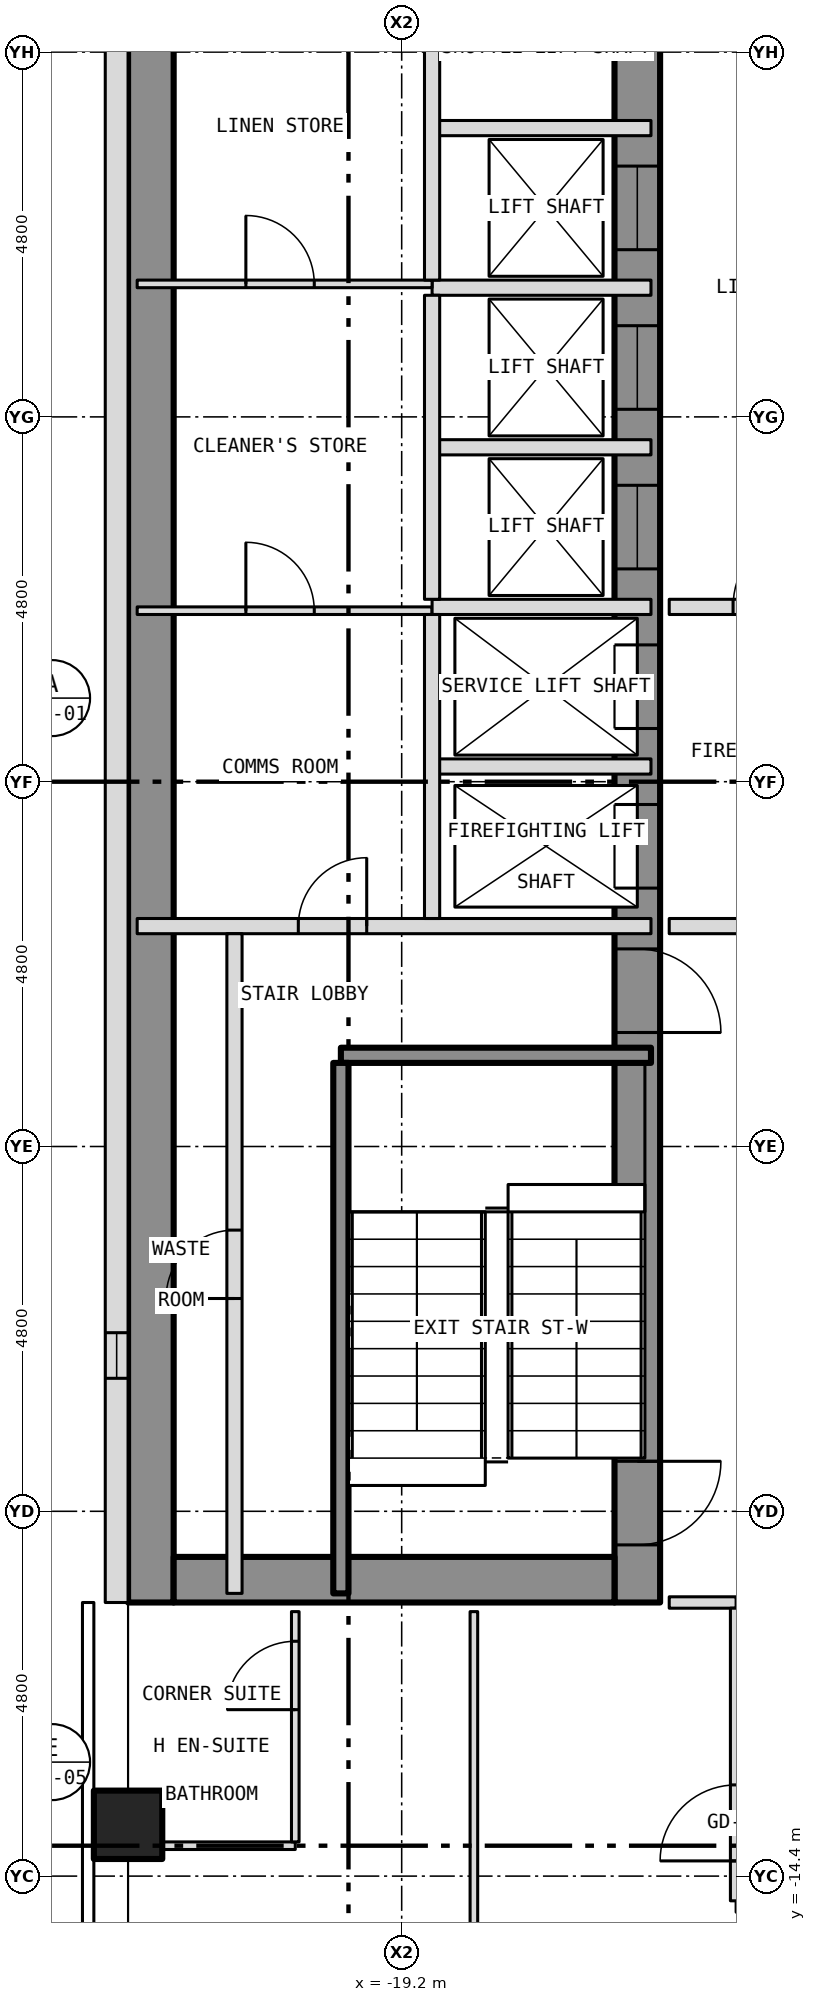
"""IFC4 building model, lengths in metres.
Left out: names, types, materials, properties, quantities, classifications, styles, units other than length and angle.
Written with IfcOpenShell. Run it as: python <this file> out.ifc"""

import sys

from ifc_helpers import new_model, si_unit, direction, frame, frame_2d, origin, origin_2d, place, context, subcontext, project, spatial, rectangle, hollow_rectangle, extrude, element, fill, save


model = new_model("IFC4")
c1 = context("Model", 3, precision=1e-05, world=origin(), true_north=direction((0.0, 1.0)))
c2 = subcontext(c1, "Body", "Model", "MODEL_VIEW")
j1 = project(units=[si_unit("LENGTHUNIT", "METRE"), si_unit("PLANEANGLEUNIT", "RADIAN")], contexts=[c1])
p1 = place(None, origin())
s1 = spatial("IfcSite", under=j1, at=p1, CompositionType="ELEMENT")
p2 = place(p1, origin())
s2 = spatial("IfcBuilding", under=s1, at=p2, CompositionType="ELEMENT")
p3 = place(p2, frame((0.0, 0.0, 103.0)))
s3 = spatial("IfcBuildingStorey", under=s2, at=p3, CompositionType="ELEMENT", Elevation=103.0)
p4 = place(p3, frame((-22.8, -13.725, -0.15), z_axis=(0.0, 0.0, 1.0), x_axis=(1.0, 0.0, 0.0)))
e1 = element("IfcColumn", 1, at=p4, inside=s3, PredefinedType="COLUMN", context=c2, shape_type="SweptSolid", body=[
    extrude(hollow_rectangle(XDim=0.9, YDim=0.9, WallThickness=0.05, at=origin_2d()), origin(), (0.0, 0.0, 1.0), 3.5),
])
p5 = place(p3, frame((-16.1, -10.8, 0.0), z_axis=(0.0, 0.0, 1.0), x_axis=(0.0, 1.0, 0.0)))
e2 = element("IfcWall", 2, at=p5, inside=s3, PredefinedType="SHEAR", context=c2, shape_type="SweptSolid", body=[
    extrude(rectangle(XDim=21.6, YDim=0.6, at=frame_2d((10.8, 0.0))), origin(), (0.0, 0.0, 1.0), 3.25),
])
p6 = place(p5, frame((9.4, 0.0, 0.0)))
e3 = element("IfcOpeningElement", 3, at=p6, cuts=e2, PredefinedType="OPENING", context=c2, shape_type="SweptSolid", body=[
    extrude(rectangle(XDim=1.1, YDim=2.1, at=frame_2d((0.55, 1.05))), frame((0.0, 0.312, 0.0), z_axis=(0.0, -1.0, 0.0), x_axis=(1.0, 0.0, 0.0)), (0.0, 0.0, 1.0), 0.624),
])
p7 = place(p5, frame((11.5, 0.0, 0.0)))
e4 = element("IfcOpeningElement", 4, at=p7, cuts=e2, PredefinedType="OPENING", context=c2, shape_type="SweptSolid", body=[
    extrude(rectangle(XDim=1.1, YDim=2.1, at=frame_2d((0.55, 1.05))), frame((0.0, 0.312, 0.0), z_axis=(0.0, -1.0, 0.0), x_axis=(1.0, 0.0, 0.0)), (0.0, 0.0, 1.0), 0.624),
])
p8 = place(p5, frame((13.6, 0.0, 0.0)))
e5 = element("IfcOpeningElement", 5, at=p8, cuts=e2, PredefinedType="OPENING", context=c2, shape_type="SweptSolid", body=[
    extrude(rectangle(XDim=1.1, YDim=2.1, at=frame_2d((0.55, 1.05))), frame((0.0, 0.312, 0.0), z_axis=(0.0, -1.0, 0.0), x_axis=(1.0, 0.0, 0.0)), (0.0, 0.0, 1.0), 0.624),
])
p9 = place(p5, frame((15.7, 0.0, 0.0)))
e6 = element("IfcOpeningElement", 6, at=p9, cuts=e2, PredefinedType="OPENING", context=c2, shape_type="SweptSolid", body=[
    extrude(rectangle(XDim=1.1, YDim=2.1, at=frame_2d((0.55, 1.05))), frame((0.0, 0.312, 0.0), z_axis=(0.0, -1.0, 0.0), x_axis=(1.0, 0.0, 0.0)), (0.0, 0.0, 1.0), 0.624),
])
p10 = place(p5, frame((17.8, 0.0, 0.0)))
e7 = element("IfcOpeningElement", 7, at=p10, cuts=e2, PredefinedType="OPENING", context=c2, shape_type="SweptSolid", body=[
    extrude(rectangle(XDim=1.1, YDim=2.1, at=frame_2d((0.55, 1.05))), frame((0.0, 0.312, 0.0), z_axis=(0.0, -1.0, 0.0), x_axis=(1.0, 0.0, 0.0)), (0.0, 0.0, 1.0), 0.624),
])
p11 = place(p5, frame((0.758, 0.0, 0.0)))
e8 = element("IfcOpeningElement", 8, at=p11, cuts=e2, PredefinedType="OPENING", context=c2, shape_type="SweptSolid", body=[
    extrude(rectangle(XDim=1.1, YDim=2.1, at=frame_2d((0.55, 1.05))), frame((0.0, 0.312, 0.0), z_axis=(0.0, -1.0, 0.0), x_axis=(1.0, 0.0, 0.0)), (0.0, 0.0, 1.0), 0.624),
])
p12 = place(p5, frame((7.5, 0.0, 0.0)))
e9 = element("IfcOpeningElement", 9, at=p12, cuts=e2, PredefinedType="OPENING", context=c2, shape_type="SweptSolid", body=[
    extrude(rectangle(XDim=1.1, YDim=2.1, at=frame_2d((0.55, 1.05))), frame((0.0, 0.312, 0.0), z_axis=(0.0, -1.0, 0.0), x_axis=(1.0, 0.0, 0.0)), (0.0, 0.0, 1.0), 0.624),
])
p13 = place(p3, frame((-22.5, -10.8, 0.0), z_axis=(0.0, 0.0, 1.0), x_axis=(0.0, 1.0, 0.0)))
e10 = element("IfcWall", 10, at=p13, inside=s3, PredefinedType="SHEAR", context=c2, shape_type="SweptSolid", body=[
    extrude(rectangle(XDim=21.6, YDim=0.6, at=frame_2d((10.8, 0.0))), origin(), (0.0, 0.0, 1.0), 3.25),
])
p14 = place(p3, frame((-22.2, -10.5, 0.0), z_axis=(0.0, 0.0, 1.0), x_axis=(1.0, 0.0, 0.0)))
e11 = element("IfcWall", 11, at=p14, inside=s3, PredefinedType="SHEAR", context=c2, shape_type="SweptSolid", body=[
    extrude(rectangle(XDim=5.8, YDim=0.6, at=frame_2d((2.9, 0.0))), origin(), (0.0, 0.0, 1.0), 3.25),
])
p15 = place(p3, frame((-22.95, 10.8, 0.0), z_axis=(0.0, 0.0, 1.0), x_axis=(0.0, -1.0, 0.0)))
e12 = element("IfcWall", 12, at=p15, inside=s3, PredefinedType="SOLIDWALL", context=c2, shape_type="SweptSolid", body=[
    extrude(rectangle(XDim=21.6, YDim=0.3, at=frame_2d((10.8, 0.0))), origin(), (0.0, 0.0, 1.0), 3.5),
])
p16 = place(p15, frame((18.05, 0.0, 1.0)))
e13 = element("IfcOpeningElement", 13, at=p16, cuts=e12, PredefinedType="OPENING", context=c2, shape_type="SweptSolid", body=[
    extrude(rectangle(XDim=0.6, YDim=1.5, at=frame_2d((0.3, 0.75))), frame((0.0, 0.162, 0.0), z_axis=(0.0, -1.0, 0.0), x_axis=(1.0, 0.0, 0.0)), (0.0, 0.0, 1.0), 0.324),
])
p17 = place(p3, frame((-22.68, -14.0, 0.0), z_axis=(0.0, 0.0, 1.0), x_axis=(1.0, 0.0, 0.0)))
e14 = element("IfcWall", 14, at=p17, inside=s3, PredefinedType="PARTITIONING", context=c2, shape_type="SweptSolid", body=[
    extrude(rectangle(XDim=2.08, YDim=0.1, at=frame_2d((1.04, 0.0))), origin(), (0.0, 0.0, 1.0), 3.35),
])
p18 = place(p3, frame((-15.68, -10.8, 0.0), z_axis=(0.0, 0.0, 1.0), x_axis=(1.0, 0.0, 0.0)))
e15 = element("IfcWall", 15, at=p18, inside=s3, PredefinedType="PARTITIONING", context=c2, shape_type="SweptSolid", body=[
    extrude(rectangle(XDim=0.88, YDim=0.15, at=frame_2d((0.44, 0.0))), origin(), (0.0, 0.0, 1.0), 3.35),
])
p19 = place(p3, frame((-20.0, -3.6, 0.0), z_axis=(0.0, 0.0, 1.0), x_axis=(1.0, 0.0, 0.0)))
e16 = element("IfcWall", 16, at=p19, inside=s3, PredefinedType="SHEAR", context=c2, shape_type="SweptSolid", body=[
    extrude(rectangle(XDim=4.08, YDim=0.2, at=frame_2d((2.04, 0.0))), origin(), (0.0, 0.0, 1.0), 3.25),
])
p20 = place(p3, frame((-22.68, -1.9, 0.0), z_axis=(0.0, 0.0, 1.0), x_axis=(1.0, 0.0, 0.0)))
e17 = element("IfcWall", 17, at=p20, inside=s3, PredefinedType="PARTITIONING", context=c2, shape_type="SweptSolid", body=[
    extrude(rectangle(XDim=6.76, YDim=0.2, at=frame_2d((3.38, 0.0))), origin(), (0.0, 0.0, 1.0), 3.25),
])
p21 = place(p20, frame((2.12, 0.0, 0.0)))
e18 = element("IfcOpeningElement", 18, at=p21, cuts=e17, PredefinedType="OPENING", context=c2, shape_type="SweptSolid", body=[
    extrude(rectangle(XDim=0.9, YDim=2.1, at=frame_2d((0.45, 1.05))), frame((0.0, 0.112, 0.0), z_axis=(0.0, -1.0, 0.0), x_axis=(1.0, 0.0, 0.0)), (0.0, 0.0, 1.0), 0.224),
])
p22 = place(p3, frame((-15.68, -1.9, 0.0), z_axis=(0.0, 0.0, 1.0), x_axis=(1.0, 0.0, 0.0)))
e19 = element("IfcWall", 19, at=p22, inside=s3, PredefinedType="PARTITIONING", context=c2, shape_type="SweptSolid", body=[
    extrude(rectangle(XDim=3.28, YDim=0.2, at=frame_2d((1.64, 0.0))), origin(), (0.0, 0.0, 1.0), 3.35),
])
p23 = place(p22, frame((0.94, 0.0, 0.0)))
e20 = element("IfcOpeningElement", 20, at=p23, cuts=e19, PredefinedType="OPENING", context=c2, shape_type="SweptSolid", body=[
    extrude(rectangle(XDim=1.1, YDim=2.1, at=frame_2d((0.55, 1.05))), frame((0.0, 0.112, 0.0), z_axis=(0.0, -1.0, 0.0), x_axis=(1.0, 0.0, 0.0)), (0.0, 0.0, 1.0), 0.224),
])
p24 = place(p3, frame((-18.8, 0.2, 0.0), z_axis=(0.0, 0.0, 1.0), x_axis=(1.0, 0.0, 0.0)))
e21 = element("IfcWall", 21, at=p24, inside=s3, PredefinedType="PARTITIONING", context=c2, shape_type="SweptSolid", body=[
    extrude(rectangle(XDim=2.88, YDim=0.2, at=frame_2d((1.44, 0.0))), origin(), (0.0, 0.0, 1.0), 3.25),
])
p25 = place(p3, frame((-22.68, 2.25, 0.0), z_axis=(0.0, 0.0, 1.0), x_axis=(1.0, 0.0, 0.0)))
e22 = element("IfcWall", 22, at=p25, inside=s3, PredefinedType="PARTITIONING", context=c2, shape_type="SweptSolid", body=[
    extrude(rectangle(XDim=3.88, YDim=0.1, at=frame_2d((1.94, 0.0))), origin(), (0.0, 0.0, 1.0), 3.25),
])
p26 = place(p25, frame((1.43, 0.0, 0.0)))
e23 = element("IfcOpeningElement", 23, at=p26, cuts=e22, PredefinedType="OPENING", context=c2, shape_type="SweptSolid", body=[
    extrude(rectangle(XDim=0.9, YDim=2.1, at=frame_2d((0.45, 1.05))), frame((0.0, 0.062, 0.0), z_axis=(0.0, -1.0, 0.0), x_axis=(1.0, 0.0, 0.0)), (0.0, 0.0, 1.0), 0.124),
])
p27 = place(p3, frame((-18.8, 2.3, 0.0), z_axis=(0.0, 0.0, 1.0), x_axis=(1.0, 0.0, 0.0)))
e24 = element("IfcWall", 24, at=p27, inside=s3, PredefinedType="PARTITIONING", context=c2, shape_type="SweptSolid", body=[
    extrude(rectangle(XDim=2.88, YDim=0.2, at=frame_2d((1.44, 0.0))), origin(), (0.0, 0.0, 1.0), 3.25),
])
p28 = place(p3, frame((-15.68, 2.3, 0.0), z_axis=(0.0, 0.0, 1.0), x_axis=(1.0, 0.0, 0.0)))
e25 = element("IfcWall", 25, at=p28, inside=s3, PredefinedType="PARTITIONING", context=c2, shape_type="SweptSolid", body=[
    extrude(rectangle(XDim=3.28, YDim=0.2, at=frame_2d((1.64, 0.0))), origin(), (0.0, 0.0, 1.0), 3.35),
])
p29 = place(p28, frame((0.84, 0.0, 0.0)))
e26 = element("IfcOpeningElement", 26, at=p29, cuts=e25, PredefinedType="OPENING", context=c2, shape_type="SweptSolid", body=[
    extrude(rectangle(XDim=1.1, YDim=2.1, at=frame_2d((0.55, 1.05))), frame((0.0, 0.112, 0.0), z_axis=(0.0, -1.0, 0.0), x_axis=(1.0, 0.0, 0.0)), (0.0, 0.0, 1.0), 0.224),
])
for number, where, z_axis, x_axis in (
    (27, (-18.8, 4.4, 0.0), (0.0, 0.0, 1.0), (1.0, 0.0, 0.0)),
    (28, (-18.8, 6.5, 0.0), (0.0, 0.0, 1.0), (1.0, 0.0, 0.0)),
):
    element("IfcWall", number, at=place(p3, frame(where, z_axis=z_axis, x_axis=x_axis)), inside=s3, PredefinedType="PARTITIONING", context=c2, shape_type="SweptSolid", body=[
        extrude(rectangle(XDim=2.88, YDim=0.2, at=frame_2d((1.44, 0.0))), origin(), (0.0, 0.0, 1.0), 3.25),
    ])
p30 = place(p3, frame((-22.68, 6.55, 0.0), z_axis=(0.0, 0.0, 1.0), x_axis=(1.0, 0.0, 0.0)))
e29 = element("IfcWall", 29, at=p30, inside=s3, PredefinedType="PARTITIONING", context=c2, shape_type="SweptSolid", body=[
    extrude(rectangle(XDim=3.88, YDim=0.1, at=frame_2d((1.94, 0.0))), origin(), (0.0, 0.0, 1.0), 3.25),
])
p31 = place(p30, frame((1.43, 0.0, 0.0)))
e30 = element("IfcOpeningElement", 30, at=p31, cuts=e29, PredefinedType="OPENING", context=c2, shape_type="SweptSolid", body=[
    extrude(rectangle(XDim=0.9, YDim=2.1, at=frame_2d((0.45, 1.05))), frame((0.0, 0.062, 0.0), z_axis=(0.0, -1.0, 0.0), x_axis=(1.0, 0.0, 0.0)), (0.0, 0.0, 1.0), 0.124),
])
p32 = place(p3, frame((-18.8, 8.6, 0.0), z_axis=(0.0, 0.0, 1.0), x_axis=(1.0, 0.0, 0.0)))
e31 = element("IfcWall", 31, at=p32, inside=s3, PredefinedType="PARTITIONING", context=c2, shape_type="SweptSolid", body=[
    extrude(rectangle(XDim=2.88, YDim=0.2, at=frame_2d((1.44, 0.0))), origin(), (0.0, 0.0, 1.0), 3.25),
])
p33 = place(p3, frame((-21.4, -10.68, 0.0), z_axis=(0.0, 0.0, 1.0), x_axis=(0.0, 1.0, 0.0)))
e32 = element("IfcWall", 32, at=p33, inside=s3, PredefinedType="PARTITIONING", context=c2, shape_type="SweptSolid", body=[
    extrude(rectangle(XDim=8.68, YDim=0.2, at=frame_2d((4.34, 0.0))), origin(), (0.0, 0.0, 1.0), 3.25),
])
p34 = place(p33, frame((3.88, 0.0, 0.0)))
e33 = element("IfcOpeningElement", 33, at=p34, cuts=e32, PredefinedType="OPENING", context=c2, shape_type="SweptSolid", body=[
    extrude(rectangle(XDim=0.9, YDim=2.1, at=frame_2d((0.45, 1.05))), frame((0.0, 0.112, 0.0), z_axis=(0.0, -1.0, 0.0), x_axis=(1.0, 0.0, 0.0)), (0.0, 0.0, 1.0), 0.224),
])
p35 = place(p3, frame((-20.6, -13.95, 0.0), z_axis=(0.0, 0.0, 1.0), x_axis=(0.0, 1.0, 0.0)))
e34 = element("IfcWall", 34, at=p35, inside=s3, PredefinedType="PARTITIONING", context=c2, shape_type="SweptSolid", body=[
    extrude(rectangle(XDim=3.03, YDim=0.1, at=frame_2d((1.515, 0.0))), origin(), (0.0, 0.0, 1.0), 3.35),
])
p36 = place(p35, frame((1.74, 0.0, 0.0)))
e35 = element("IfcOpeningElement", 35, at=p36, cuts=e34, PredefinedType="OPENING", context=c2, shape_type="SweptSolid", body=[
    extrude(rectangle(XDim=0.9, YDim=2.1, at=frame_2d((0.45, 1.05))), frame((0.0, 0.062, 0.0), z_axis=(0.0, -1.0, 0.0), x_axis=(1.0, 0.0, 0.0)), (0.0, 0.0, 1.0), 0.124),
])
p37 = place(p3, frame((-20.0, -10.68, 0.0), z_axis=(0.0, 0.0, 1.0), x_axis=(0.0, 1.0, 0.0)))
e36 = element("IfcWall", 36, at=p37, inside=s3, PredefinedType="SHEAR", context=c2, shape_type="SweptSolid", body=[
    extrude(rectangle(XDim=6.98, YDim=0.2, at=frame_2d((3.49, 0.0))), origin(), (0.0, 0.0, 1.0), 3.25),
])
for number, where, z_axis, x_axis in (
    (37, (-18.8, -1.8, 0.0), (0.0, 0.0, 1.0), (0.0, 1.0, 0.0)),
    (38, (-18.8, 2.4, 0.0), (0.0, 0.0, 1.0), (0.0, 1.0, 0.0)),
):
    element("IfcWall", number, at=place(p3, frame(where, z_axis=z_axis, x_axis=x_axis)), inside=s3, PredefinedType="PARTITIONING", context=c2, shape_type="SweptSolid", body=[
        extrude(rectangle(XDim=4.0, YDim=0.2, at=frame_2d((2.0, 0.0))), origin(), (0.0, 0.0, 1.0), 3.25),
    ])
p38 = place(p3, frame((-18.8, 6.6, 0.0), z_axis=(0.0, 0.0, 1.0), x_axis=(0.0, 1.0, 0.0)))
e39 = element("IfcWall", 39, at=p38, inside=s3, PredefinedType="PARTITIONING", context=c2, shape_type="SweptSolid", body=[
    extrude(rectangle(XDim=4.08, YDim=0.2, at=frame_2d((2.04, 0.0))), origin(), (0.0, 0.0, 1.0), 3.25),
])
p39 = place(p3, frame((-18.25, -18.191, 0.0), z_axis=(0.0, 0.0, 1.0), x_axis=(0.0, 1.0, 0.0)))
e40 = element("IfcWall", 40, at=p39, inside=s3, PredefinedType="PARTITIONING", context=c2, shape_type="SweptSolid", body=[
    extrude(rectangle(XDim=7.271, YDim=0.1, at=frame_2d((3.635, 0.0))), origin(), (0.0, 0.0, 1.0), 3.35),
])
p40 = place(p39, frame((0.941, 0.0, 0.0)))
e41 = element("IfcOpeningElement", 41, at=p40, cuts=e40, PredefinedType="OPENING", context=c2, shape_type="SweptSolid", body=[
    extrude(rectangle(XDim=0.9, YDim=2.1, at=frame_2d((0.45, 1.05))), frame((0.0, 0.062, 0.0), z_axis=(0.0, -1.0, 0.0), x_axis=(1.0, 0.0, 0.0)), (0.0, 0.0, 1.0), 0.124),
])
p41 = place(p3, frame((-14.8, -14.725, 0.0), z_axis=(0.0, 0.0, 1.0), x_axis=(0.0, 1.0, 0.0)))
e42 = element("IfcWall", 42, at=p41, inside=s3, PredefinedType="PARTITIONING", context=c2, shape_type="SweptSolid", body=[
    extrude(rectangle(XDim=3.85, YDim=0.15, at=frame_2d((1.925, 0.0))), origin(), (0.0, 0.0, 1.0), 3.35),
])
p42 = place(p41, frame((0.525, 0.0, 0.0)))
e43 = element("IfcOpeningElement", 43, at=p42, cuts=e42, PredefinedType="OPENING", context=c2, shape_type="SweptSolid", body=[
    extrude(rectangle(XDim=1.0, YDim=2.1, at=frame_2d((0.5, 1.05))), frame((0.0, 0.087, 0.0), z_axis=(0.0, -1.0, 0.0), x_axis=(1.0, 0.0, 0.0)), (0.0, 0.0, 1.0), 0.174),
])
p43 = place(p16, origin())
e44 = element("IfcWindow", 44, at=p43, inside=s3, PartitioningType="SINGLE_PANEL", PredefinedType="WINDOW", context=c2, shape_type="SweptSolid", body=[
    extrude(rectangle(XDim=0.6, YDim=1.5, at=frame_2d((0.3, 0.75))), frame((0.0, -0.06, 0.0), z_axis=(0.0, -1.0, 0.0), x_axis=(1.0, 0.0, 0.0)), (0.0, 0.0, 1.0), 0.06),
])
fill(e13, e44)
p44 = place(p6, origin())
e45 = element("IfcDoor", 45, at=p44, inside=s3, OperationType="SLIDING_TO_LEFT", PredefinedType="DOOR", context=c2, shape_type="SweptSolid", body=[
    extrude(rectangle(XDim=1.1, YDim=2.1, at=frame_2d((0.55, 1.05))), frame((0.0, 0.025, 0.0), z_axis=(0.0, -1.0, 0.0), x_axis=(1.0, 0.0, 0.0)), (0.0, 0.0, 1.0), 0.05),
])
fill(e3, e45)
p45 = place(p7, origin())
e46 = element("IfcDoor", 46, at=p45, inside=s3, OperationType="SLIDING_TO_LEFT", PredefinedType="DOOR", context=c2, shape_type="SweptSolid", body=[
    extrude(rectangle(XDim=1.1, YDim=2.1, at=frame_2d((0.55, 1.05))), frame((0.0, 0.025, 0.0), z_axis=(0.0, -1.0, 0.0), x_axis=(1.0, 0.0, 0.0)), (0.0, 0.0, 1.0), 0.05),
])
fill(e4, e46)
p46 = place(p8, origin())
e47 = element("IfcDoor", 47, at=p46, inside=s3, OperationType="SLIDING_TO_LEFT", PredefinedType="DOOR", context=c2, shape_type="SweptSolid", body=[
    extrude(rectangle(XDim=1.1, YDim=2.1, at=frame_2d((0.55, 1.05))), frame((0.0, 0.025, 0.0), z_axis=(0.0, -1.0, 0.0), x_axis=(1.0, 0.0, 0.0)), (0.0, 0.0, 1.0), 0.05),
])
fill(e5, e47)
p47 = place(p9, origin())
e48 = element("IfcDoor", 48, at=p47, inside=s3, OperationType="SLIDING_TO_LEFT", PredefinedType="DOOR", context=c2, shape_type="SweptSolid", body=[
    extrude(rectangle(XDim=1.1, YDim=2.1, at=frame_2d((0.55, 1.05))), frame((0.0, 0.025, 0.0), z_axis=(0.0, -1.0, 0.0), x_axis=(1.0, 0.0, 0.0)), (0.0, 0.0, 1.0), 0.05),
])
fill(e6, e48)
p48 = place(p10, origin())
e49 = element("IfcDoor", 49, at=p48, inside=s3, OperationType="SLIDING_TO_LEFT", PredefinedType="DOOR", context=c2, shape_type="SweptSolid", body=[
    extrude(rectangle(XDim=1.1, YDim=2.1, at=frame_2d((0.55, 1.05))), frame((0.0, 0.025, 0.0), z_axis=(0.0, -1.0, 0.0), x_axis=(1.0, 0.0, 0.0)), (0.0, 0.0, 1.0), 0.05),
])
fill(e7, e49)
p49 = place(p11, origin())
e50 = element("IfcDoor", 50, at=p49, inside=s3, OperationType="SINGLE_SWING_RIGHT", PredefinedType="DOOR", context=c2, shape_type="SweptSolid", body=[
    extrude(rectangle(XDim=1.1, YDim=2.1, at=frame_2d((0.55, 1.05))), frame((0.0, 0.025, 0.0), z_axis=(0.0, -1.0, 0.0), x_axis=(1.0, 0.0, 0.0)), (0.0, 0.0, 1.0), 0.05),
])
fill(e8, e50)
p50 = place(p12, origin())
e51 = element("IfcDoor", 51, at=p50, inside=s3, OperationType="SINGLE_SWING_LEFT", PredefinedType="DOOR", context=c2, shape_type="SweptSolid", body=[
    extrude(rectangle(XDim=1.1, YDim=2.1, at=frame_2d((0.55, 1.05))), frame((0.0, 0.025, 0.0), z_axis=(0.0, -1.0, 0.0), x_axis=(1.0, 0.0, 0.0)), (0.0, 0.0, 1.0), 0.05),
])
fill(e9, e51)
p51 = place(p34, origin())
e52 = element("IfcDoor", 52, at=p51, inside=s3, OperationType="SINGLE_SWING_LEFT", PredefinedType="DOOR", context=c2, shape_type="SweptSolid", body=[
    extrude(rectangle(XDim=0.9, YDim=2.1, at=frame_2d((0.45, 1.05))), frame((0.0, 0.025, 0.0), z_axis=(0.0, -1.0, 0.0), x_axis=(1.0, 0.0, 0.0)), (0.0, 0.0, 1.0), 0.05),
])
fill(e33, e52)
p52 = place(p21, origin())
e53 = element("IfcDoor", 53, at=p52, inside=s3, OperationType="SINGLE_SWING_RIGHT", PredefinedType="DOOR", context=c2, shape_type="SweptSolid", body=[
    extrude(rectangle(XDim=0.9, YDim=2.1, at=frame_2d((0.45, 1.05))), frame((0.0, 0.025, 0.0), z_axis=(0.0, -1.0, 0.0), x_axis=(1.0, 0.0, 0.0)), (0.0, 0.0, 1.0), 0.05),
])
fill(e18, e53)
p53 = place(p26, origin())
e54 = element("IfcDoor", 54, at=p53, inside=s3, OperationType="SINGLE_SWING_LEFT", PredefinedType="DOOR", context=c2, shape_type="SweptSolid", body=[
    extrude(rectangle(XDim=0.9, YDim=2.1, at=frame_2d((0.45, 1.05))), frame((0.0, 0.025, 0.0), z_axis=(0.0, -1.0, 0.0), x_axis=(1.0, 0.0, 0.0)), (0.0, 0.0, 1.0), 0.05),
])
fill(e23, e54)
p54 = place(p31, origin())
e55 = element("IfcDoor", 55, at=p54, inside=s3, OperationType="SINGLE_SWING_LEFT", PredefinedType="DOOR", context=c2, shape_type="SweptSolid", body=[
    extrude(rectangle(XDim=0.9, YDim=2.1, at=frame_2d((0.45, 1.05))), frame((0.0, 0.025, 0.0), z_axis=(0.0, -1.0, 0.0), x_axis=(1.0, 0.0, 0.0)), (0.0, 0.0, 1.0), 0.05),
])
fill(e30, e55)
p55 = place(p29, origin())
e56 = element("IfcDoor", 56, at=p55, inside=s3, OperationType="SINGLE_SWING_RIGHT", PredefinedType="DOOR", context=c2, shape_type="SweptSolid", body=[
    extrude(rectangle(XDim=1.1, YDim=2.1, at=frame_2d((0.55, 1.05))), frame((0.0, 0.025, 0.0), z_axis=(0.0, -1.0, 0.0), x_axis=(1.0, 0.0, 0.0)), (0.0, 0.0, 1.0), 0.05),
])
fill(e26, e56)
p56 = place(p42, origin())
e57 = element("IfcDoor", 57, at=p56, inside=s3, OperationType="SINGLE_SWING_LEFT", PredefinedType="DOOR", context=c2, shape_type="SweptSolid", body=[
    extrude(rectangle(XDim=1.0, YDim=2.1, at=frame_2d((0.5, 1.05))), frame((0.0, 0.025, 0.0), z_axis=(0.0, -1.0, 0.0), x_axis=(1.0, 0.0, 0.0)), (0.0, 0.0, 1.0), 0.05),
])
fill(e43, e57)
p57 = place(p36, origin())
e58 = element("IfcDoor", 58, at=p57, inside=s3, OperationType="SINGLE_SWING_LEFT", PredefinedType="DOOR", context=c2, shape_type="SweptSolid", body=[
    extrude(rectangle(XDim=0.9, YDim=2.1, at=frame_2d((0.45, 1.05))), frame((0.0, 0.025, 0.0), z_axis=(0.0, -1.0, 0.0), x_axis=(1.0, 0.0, 0.0)), (0.0, 0.0, 1.0), 0.05),
])
fill(e35, e58)
save(model, sys.argv[1])
